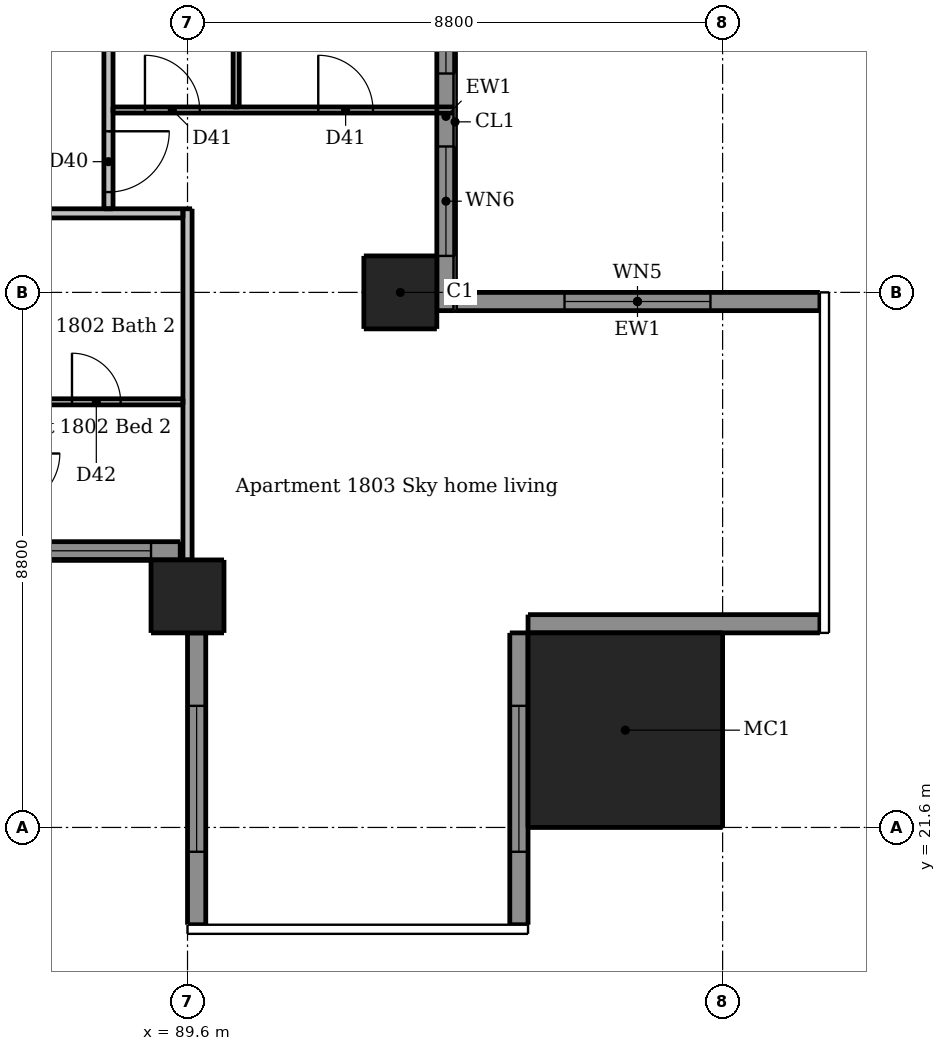
"""IFC4 building model, lengths in metres.
Left out: names, types, materials, properties, quantities, classifications, styles, units other than length and angle.
Written with IfcOpenShell. Run it as: python <this file> out.ifc"""

import sys

from ifc_helpers import new_model, si_unit, direction, frame, frame_2d, origin, origin_2d, place, context, subcontext, project, spatial, rectangle, extrude, element, fill, save


model = new_model("IFC4")
c1 = context("Model", 3, precision=1e-05, world=origin(), true_north=direction((0.0, 1.0)))
c2 = subcontext(c1, "Body", "Model", "MODEL_VIEW")
j1 = project(units=[si_unit("LENGTHUNIT", "METRE"), si_unit("PLANEANGLEUNIT", "RADIAN")], contexts=[c1])
p1 = place(None, origin())
s1 = spatial("IfcSite", under=j1, at=p1, CompositionType="ELEMENT")
p2 = place(p1, origin())
s2 = spatial("IfcBuilding", under=s1, at=p2, CompositionType="ELEMENT")
p3 = place(p2, frame((0.0, 0.0, 66.4)))
s3 = spatial("IfcBuildingStorey", under=s2, at=p3, CompositionType="ELEMENT", Elevation=66.4)
for number, where, z_axis, x_axis in (
    (1, (89.6, 25.4, 0.0), (0.0, 0.0, 1.0), (1.0, 0.0, 0.0)),
    (2, (93.1, 30.4, 0.0), (0.0, 0.0, 1.0), (1.0, 0.0, 0.0)),
):
    element("IfcColumn", number, at=place(p3, frame(where, z_axis=z_axis, x_axis=x_axis)), inside=s3, PredefinedType="COLUMN", context=c2, shape_type="SweptSolid", body=[
        extrude(rectangle(XDim=1.2, YDim=1.2, at=origin_2d()), origin(), (0.0, 0.0, 1.0), 2.95),
    ])
p4 = place(p3, frame((96.8, 23.2, 0.0), z_axis=(0.0, 0.0, 1.0), x_axis=(1.0, 0.0, 0.0)))
e3 = element("IfcColumn", 3, at=p4, inside=s3, PredefinedType="COLUMN", context=c2, shape_type="SweptSolid", body=[
    extrude(rectangle(XDim=3.2, YDim=3.2, at=origin_2d()), origin(), (0.0, 0.0, 1.0), 3.3),
])
p5 = place(p3, frame((89.75, 24.8, 0.0), z_axis=(0.0, 0.0, 1.0), x_axis=(0.0, -1.0, 0.0)))
e4 = element("IfcWall", 4, at=p5, inside=s3, PredefinedType="SOLIDWALL", context=c2, shape_type="SweptSolid", body=[
    extrude(rectangle(XDim=4.8, YDim=0.3, at=frame_2d((2.4, 0.0))), origin(), (0.0, 0.0, 1.0), 2.95),
])
p6 = place(p5, frame((1.2, 0.0, 0.15)))
e5 = element("IfcOpeningElement", 5, at=p6, cuts=e4, PredefinedType="OPENING", context=c2, shape_type="SweptSolid", body=[
    extrude(rectangle(XDim=2.4, YDim=2.1, at=frame_2d((1.2, 1.05))), frame((0.0, 0.16, 0.0), z_axis=(0.0, -1.0, 0.0), x_axis=(1.0, 0.0, 0.0)), (0.0, 0.0, 1.0), 0.32),
])
p7 = place(p3, frame((95.05, 20.0, 0.0), z_axis=(0.0, 0.0, 1.0), x_axis=(0.0, 1.0, 0.0)))
e6 = element("IfcWall", 6, at=p7, inside=s3, PredefinedType="SOLIDWALL", context=c2, shape_type="SweptSolid", body=[
    extrude(rectangle(XDim=4.8, YDim=0.3, at=frame_2d((2.4, 0.0))), origin(), (0.0, 0.0, 1.0), 2.95),
])
p8 = place(p7, frame((1.2, 0.0, 0.15)))
e7 = element("IfcOpeningElement", 7, at=p8, cuts=e6, PredefinedType="OPENING", context=c2, shape_type="SweptSolid", body=[
    extrude(rectangle(XDim=2.4, YDim=2.1, at=frame_2d((1.2, 1.05))), frame((0.0, 0.16, 0.0), z_axis=(0.0, -1.0, 0.0), x_axis=(1.0, 0.0, 0.0)), (0.0, 0.0, 1.0), 0.32),
])
p9 = place(p3, frame((95.2, 24.95, 0.0), z_axis=(0.0, 0.0, 1.0), x_axis=(1.0, 0.0, 0.0)))
e8 = element("IfcWall", 8, at=p9, inside=s3, PredefinedType="SOLIDWALL", context=c2, shape_type="SweptSolid", body=[
    extrude(rectangle(XDim=4.8, YDim=0.3, at=frame_2d((2.4, 0.0))), origin(), (0.0, 0.0, 1.0), 2.95),
])
p10 = place(p3, frame((100.0, 30.25, 0.0), z_axis=(0.0, 0.0, 1.0), x_axis=(-1.0, 0.0, 0.0)))
e9 = element("IfcWall", 9, at=p10, inside=s3, PredefinedType="SOLIDWALL", context=c2, shape_type="SweptSolid", body=[
    extrude(rectangle(XDim=6.0, YDim=0.3, at=frame_2d((3.0, 0.0))), origin(), (0.0, 0.0, 1.0), 2.95),
])
p11 = place(p10, frame((1.8, 0.0, 0.15)))
e10 = element("IfcOpeningElement", 10, at=p11, cuts=e9, PredefinedType="OPENING", context=c2, shape_type="SweptSolid", body=[
    extrude(rectangle(XDim=2.4, YDim=2.1, at=frame_2d((1.2, 1.05))), frame((0.0, 0.16, 0.0), z_axis=(0.0, -1.0, 0.0), x_axis=(1.0, 0.0, 0.0)), (0.0, 0.0, 1.0), 0.32),
])
p12 = place(p3, frame((83.6, 26.15, 0.0), z_axis=(0.0, 0.0, 1.0), x_axis=(1.0, 0.0, 0.0)))
e11 = element("IfcWall", 11, at=p12, inside=s3, PredefinedType="SOLIDWALL", context=c2, shape_type="SweptSolid", body=[
    extrude(rectangle(XDim=5.88, YDim=0.3, at=frame_2d((2.94, 0.0))), origin(), (0.0, 0.0, 1.0), 2.95),
])
p13 = place(p12, frame((0.6, 0.0, 0.15)))
e12 = element("IfcOpeningElement", 12, at=p13, cuts=e11, PredefinedType="OPENING", context=c2, shape_type="SweptSolid", body=[
    extrude(rectangle(XDim=1.8, YDim=2.1, at=frame_2d((0.9, 1.05))), frame((0.0, 0.16, 0.0), z_axis=(0.0, -1.0, 0.0), x_axis=(1.0, 0.0, 0.0)), (0.0, 0.0, 1.0), 0.32),
])
p14 = place(p12, frame((3.6, 0.0, 0.15)))
e13 = element("IfcOpeningElement", 13, at=p14, cuts=e11, PredefinedType="OPENING", context=c2, shape_type="SweptSolid", body=[
    extrude(rectangle(XDim=1.8, YDim=2.1, at=frame_2d((0.9, 1.05))), frame((0.0, 0.16, 0.0), z_axis=(0.0, -1.0, 0.0), x_axis=(1.0, 0.0, 0.0)), (0.0, 0.0, 1.0), 0.32),
])
p15 = place(p3, frame((93.85, 30.1, 0.0), z_axis=(0.0, 0.0, 1.0), x_axis=(0.0, 1.0, 0.0)))
e14 = element("IfcWall", 14, at=p15, inside=s3, PredefinedType="SOLIDWALL", context=c2, shape_type="SweptSolid", body=[
    extrude(rectangle(XDim=6.39, YDim=0.3, at=frame_2d((3.195, 0.0))), origin(), (0.0, 0.0, 1.0), 2.341),
])
p16 = place(p15, frame((0.9, 0.0, 0.15)))
e15 = element("IfcOpeningElement", 15, at=p16, cuts=e14, PredefinedType="OPENING", context=c2, shape_type="SweptSolid", body=[
    extrude(rectangle(XDim=1.8, YDim=2.1, at=frame_2d((0.9, 1.05))), frame((0.0, 0.16, 0.0), z_axis=(0.0, -1.0, 0.0), x_axis=(1.0, 0.0, 0.0)), (0.0, 0.0, 1.0), 0.32),
])
p17 = place(p15, frame((3.9, 0.0, 0.15)))
e16 = element("IfcOpeningElement", 16, at=p17, cuts=e14, PredefinedType="OPENING", context=c2, shape_type="SweptSolid", body=[
    extrude(rectangle(XDim=1.8, YDim=2.1, at=frame_2d((0.9, 1.05))), frame((0.0, 0.16, 0.0), z_axis=(0.0, -1.0, 0.0), x_axis=(1.0, 0.0, 0.0)), (0.0, 0.0, 1.0), 0.32),
])
p18 = place(p3, frame((90.4, 33.45, 0.0), z_axis=(0.0, 0.0, 1.0), x_axis=(0.0, 1.0, 0.0)))
e17 = element("IfcWall", 17, at=p18, inside=s3, PredefinedType="PARTITIONING", context=c2, shape_type="SweptSolid", body=[
    extrude(rectangle(XDim=9.1, YDim=0.1, at=frame_2d((4.55, 0.0))), origin(), (0.0, 0.0, 1.0), 2.95),
])
p19 = place(p18, frame((3.8, 0.0, 0.0)))
e18 = element("IfcOpeningElement", 18, at=p19, cuts=e17, PredefinedType="OPENING", context=c2, shape_type="SweptSolid", body=[
    extrude(rectangle(XDim=0.8, YDim=2.1, at=frame_2d((0.4, 1.05))), frame((0.0, 0.06, 0.0), z_axis=(0.0, -1.0, 0.0), x_axis=(1.0, 0.0, 0.0)), (0.0, 0.0, 1.0), 0.12),
])
p20 = place(p18, frame((7.1, 0.0, 0.0)))
e19 = element("IfcOpeningElement", 19, at=p20, cuts=e17, PredefinedType="OPENING", context=c2, shape_type="SweptSolid", body=[
    extrude(rectangle(XDim=0.9, YDim=2.1, at=frame_2d((0.45, 1.05))), frame((0.0, 0.06, 0.0), z_axis=(0.0, -1.0, 0.0), x_axis=(1.0, 0.0, 0.0)), (0.0, 0.0, 1.0), 0.12),
])
p21 = place(p3, frame((88.375, 33.4, 0.0), z_axis=(0.0, 0.0, 1.0), x_axis=(1.0, 0.0, 0.0)))
e20 = element("IfcWall", 20, at=p21, inside=s3, PredefinedType="PARTITIONING", context=c2, shape_type="SweptSolid", body=[
    extrude(rectangle(XDim=5.625, YDim=0.1, at=frame_2d((2.812, 0.0))), origin(), (0.0, 0.0, 1.0), 2.95),
])
p22 = place(p21, frame((0.525, 0.0, 0.0)))
e21 = element("IfcOpeningElement", 21, at=p22, cuts=e20, PredefinedType="OPENING", context=c2, shape_type="SweptSolid", body=[
    extrude(rectangle(XDim=0.9, YDim=2.1, at=frame_2d((0.45, 1.05))), frame((0.0, 0.06, 0.0), z_axis=(0.0, -1.0, 0.0), x_axis=(1.0, 0.0, 0.0)), (0.0, 0.0, 1.0), 0.12),
])
p23 = place(p21, frame((3.375, 0.0, 0.0)))
e22 = element("IfcOpeningElement", 22, at=p23, cuts=e20, PredefinedType="OPENING", context=c2, shape_type="SweptSolid", body=[
    extrude(rectangle(XDim=0.9, YDim=2.1, at=frame_2d((0.45, 1.05))), frame((0.0, 0.06, 0.0), z_axis=(0.0, -1.0, 0.0), x_axis=(1.0, 0.0, 0.0)), (0.0, 0.0, 1.0), 0.12),
])
p24 = place(p3, frame((83.65, 28.6, 0.0), z_axis=(0.0, 0.0, 1.0), x_axis=(1.0, 0.0, 0.0)))
e23 = element("IfcWall", 23, at=p24, inside=s3, PredefinedType="PARTITIONING", context=c2, shape_type="SweptSolid", body=[
    extrude(rectangle(XDim=5.875, YDim=0.1, at=frame_2d((2.938, 0.0))), origin(), (0.0, 0.0, 1.0), 2.95),
])
p25 = place(p24, frame((4.05, 0.0, 0.0)))
e24 = element("IfcOpeningElement", 24, at=p25, cuts=e23, PredefinedType="OPENING", context=c2, shape_type="SweptSolid", body=[
    extrude(rectangle(XDim=0.8, YDim=2.1, at=frame_2d((0.4, 1.05))), frame((0.0, 0.06, 0.0), z_axis=(0.0, -1.0, 0.0), x_axis=(1.0, 0.0, 0.0)), (0.0, 0.0, 1.0), 0.12),
])
p26 = place(p3, frame((88.3, 60.475, 0.0), z_axis=(0.0, 0.0, 1.0), x_axis=(0.0, -1.0, 0.0)))
e25 = element("IfcWall", 25, at=p26, inside=s3, PredefinedType="PARTITIONING", context=c2, shape_type="SweptSolid", body=[
    extrude(rectangle(XDim=28.7, YDim=0.15, at=frame_2d((14.35, 0.0))), origin(), (0.0, 0.0, 1.0), 2.95),
])
p27 = place(p26, frame((27.425, 0.0, 0.0)))
e26 = element("IfcOpeningElement", 26, at=p27, cuts=e25, PredefinedType="OPENING", context=c2, shape_type="SweptSolid", body=[
    extrude(rectangle(XDim=1.0, YDim=2.1, at=frame_2d((0.5, 1.05))), frame((0.0, 0.085, 0.0), z_axis=(0.0, -1.0, 0.0), x_axis=(1.0, 0.0, 0.0)), (0.0, 0.0, 1.0), 0.17),
])
p28 = place(p26, frame((14.525, 0.0, 0.0)))
e27 = element("IfcOpeningElement", 27, at=p28, cuts=e25, PredefinedType="OPENING", context=c2, shape_type="SweptSolid", body=[
    extrude(rectangle(XDim=1.0, YDim=2.1, at=frame_2d((0.5, 1.05))), frame((0.0, 0.085, 0.0), z_axis=(0.0, -1.0, 0.0), x_axis=(1.0, 0.0, 0.0)), (0.0, 0.0, 1.0), 0.17),
])
p29 = place(p26, frame((3.775, 0.0, 0.0)))
e28 = element("IfcOpeningElement", 28, at=p29, cuts=e25, PredefinedType="OPENING", context=c2, shape_type="SweptSolid", body=[
    extrude(rectangle(XDim=1.0, YDim=2.1, at=frame_2d((0.5, 1.05))), frame((0.0, 0.085, 0.0), z_axis=(0.0, -1.0, 0.0), x_axis=(1.0, 0.0, 0.0)), (0.0, 0.0, 1.0), 0.17),
])
p30 = place(p3, frame((89.6, 26.0, 0.0), z_axis=(0.0, 0.0, 1.0), x_axis=(0.0, 1.0, 0.0)))
e29 = element("IfcWall", 29, at=p30, inside=s3, PredefinedType="PARTITIONING", context=c2, shape_type="SweptSolid", body=[
    extrude(rectangle(XDim=5.775, YDim=0.15, at=frame_2d((2.887, 0.0))), origin(), (0.0, 0.0, 1.0), 2.332),
])
p31 = place(p3, frame((89.525, 31.7, 0.0), z_axis=(0.0, 0.0, 1.0), x_axis=(-1.0, 0.0, 0.0)))
e30 = element("IfcWall", 30, at=p31, inside=s3, PredefinedType="PARTITIONING", context=c2, shape_type="SweptSolid", body=[
    extrude(rectangle(XDim=28.75, YDim=0.15, at=frame_2d((14.375, 0.0))), origin(), (0.0, 0.0, 1.0), 2.95),
])
p32 = place(p31, frame((24.625, 0.0, 0.0)))
e31 = element("IfcOpeningElement", 31, at=p32, cuts=e30, PredefinedType="OPENING", context=c2, shape_type="SweptSolid", body=[
    extrude(rectangle(XDim=1.0, YDim=2.1, at=frame_2d((0.5, 1.05))), frame((0.0, 0.085, 0.0), z_axis=(0.0, -1.0, 0.0), x_axis=(1.0, 0.0, 0.0)), (0.0, 0.0, 1.0), 0.17),
])
p33 = place(p31, frame((8.425, 0.0, 0.0)))
e32 = element("IfcOpeningElement", 32, at=p33, cuts=e30, PredefinedType="OPENING", context=c2, shape_type="SweptSolid", body=[
    extrude(rectangle(XDim=1.0, YDim=2.1, at=frame_2d((0.5, 1.05))), frame((0.0, 0.085, 0.0), z_axis=(0.0, -1.0, 0.0), x_axis=(1.0, 0.0, 0.0)), (0.0, 0.0, 1.0), 0.17),
])
p34 = place(p6, origin())
e33 = element("IfcWindow", 33, at=p34, inside=s3, PartitioningType="DOUBLE_PANEL_VERTICAL", PredefinedType="WINDOW", context=c2, shape_type="SweptSolid", body=[
    extrude(rectangle(XDim=2.4, YDim=2.1, at=frame_2d((1.2, 1.05))), frame((0.0, 0.03, 0.0), z_axis=(0.0, -1.0, 0.0), x_axis=(1.0, 0.0, 0.0)), (0.0, 0.0, 1.0), 0.06),
])
fill(e5, e33)
p35 = place(p8, origin())
e34 = element("IfcWindow", 34, at=p35, inside=s3, PartitioningType="DOUBLE_PANEL_VERTICAL", PredefinedType="WINDOW", context=c2, shape_type="SweptSolid", body=[
    extrude(rectangle(XDim=2.4, YDim=2.1, at=frame_2d((1.2, 1.05))), frame((0.0, 0.03, 0.0), z_axis=(0.0, -1.0, 0.0), x_axis=(1.0, 0.0, 0.0)), (0.0, 0.0, 1.0), 0.06),
])
fill(e7, e34)
p36 = place(p11, origin())
e35 = element("IfcWindow", 35, at=p36, inside=s3, PartitioningType="DOUBLE_PANEL_VERTICAL", PredefinedType="WINDOW", context=c2, shape_type="SweptSolid", body=[
    extrude(rectangle(XDim=2.4, YDim=2.1, at=frame_2d((1.2, 1.05))), frame((0.0, 0.03, 0.0), z_axis=(0.0, -1.0, 0.0), x_axis=(1.0, 0.0, 0.0)), (0.0, 0.0, 1.0), 0.06),
])
fill(e10, e35)
p37 = place(p14, origin())
e36 = element("IfcWindow", 36, at=p37, inside=s3, PartitioningType="DOUBLE_PANEL_VERTICAL", PredefinedType="WINDOW", context=c2, shape_type="SweptSolid", body=[
    extrude(rectangle(XDim=1.8, YDim=2.1, at=frame_2d((0.9, 1.05))), frame((0.0, 0.03, 0.0), z_axis=(0.0, -1.0, 0.0), x_axis=(1.0, 0.0, 0.0)), (0.0, 0.0, 1.0), 0.06),
])
fill(e13, e36)
p38 = place(p16, origin())
e37 = element("IfcWindow", 37, at=p38, inside=s3, PartitioningType="DOUBLE_PANEL_VERTICAL", PredefinedType="WINDOW", context=c2, shape_type="SweptSolid", body=[
    extrude(rectangle(XDim=1.8, YDim=2.1, at=frame_2d((0.9, 1.05))), frame((0.0, 0.03, 0.0), z_axis=(0.0, -1.0, 0.0), x_axis=(1.0, 0.0, 0.0)), (0.0, 0.0, 1.0), 0.06),
])
fill(e15, e37)
p39 = place(p17, origin())
e38 = element("IfcWindow", 38, at=p39, inside=s3, PartitioningType="DOUBLE_PANEL_VERTICAL", PredefinedType="WINDOW", context=c2, shape_type="SweptSolid", body=[
    extrude(rectangle(XDim=1.8, YDim=2.1, at=frame_2d((0.9, 1.05))), frame((0.0, 0.03, 0.0), z_axis=(0.0, -1.0, 0.0), x_axis=(1.0, 0.0, 0.0)), (0.0, 0.0, 1.0), 0.06),
])
fill(e16, e38)
p40 = place(p25, origin())
e39 = element("IfcDoor", 39, at=p40, inside=s3, OperationType="SINGLE_SWING_LEFT", PredefinedType="DOOR", context=c2, shape_type="SweptSolid", body=[
    extrude(rectangle(XDim=0.8, YDim=2.1, at=frame_2d((0.4, 1.05))), frame((0.0, 0.025, 0.0), z_axis=(0.0, -1.0, 0.0), x_axis=(1.0, 0.0, 0.0)), (0.0, 0.0, 1.0), 0.05),
])
fill(e24, e39)
p41 = place(p27, origin())
e40 = element("IfcDoor", 40, at=p41, inside=s3, OperationType="SINGLE_SWING_LEFT", PredefinedType="DOOR", context=c2, shape_type="SweptSolid", body=[
    extrude(rectangle(XDim=1.0, YDim=2.1, at=frame_2d((0.5, 1.05))), frame((0.0, 0.025, 0.0), z_axis=(0.0, -1.0, 0.0), x_axis=(1.0, 0.0, 0.0)), (0.0, 0.0, 1.0), 0.05),
])
fill(e26, e40)
p42 = place(p22, origin())
e41 = element("IfcDoor", 41, at=p42, inside=s3, OperationType="SINGLE_SWING_LEFT", PredefinedType="DOOR", context=c2, shape_type="SweptSolid", body=[
    extrude(rectangle(XDim=0.9, YDim=2.1, at=frame_2d((0.45, 1.05))), frame((0.0, 0.025, 0.0), z_axis=(0.0, -1.0, 0.0), x_axis=(1.0, 0.0, 0.0)), (0.0, 0.0, 1.0), 0.05),
])
fill(e21, e41)
p43 = place(p23, origin())
e42 = element("IfcDoor", 42, at=p43, inside=s3, OperationType="SINGLE_SWING_LEFT", PredefinedType="DOOR", context=c2, shape_type="SweptSolid", body=[
    extrude(rectangle(XDim=0.9, YDim=2.1, at=frame_2d((0.45, 1.05))), frame((0.0, 0.025, 0.0), z_axis=(0.0, -1.0, 0.0), x_axis=(1.0, 0.0, 0.0)), (0.0, 0.0, 1.0), 0.05),
])
fill(e22, e42)
save(model, sys.argv[1])
